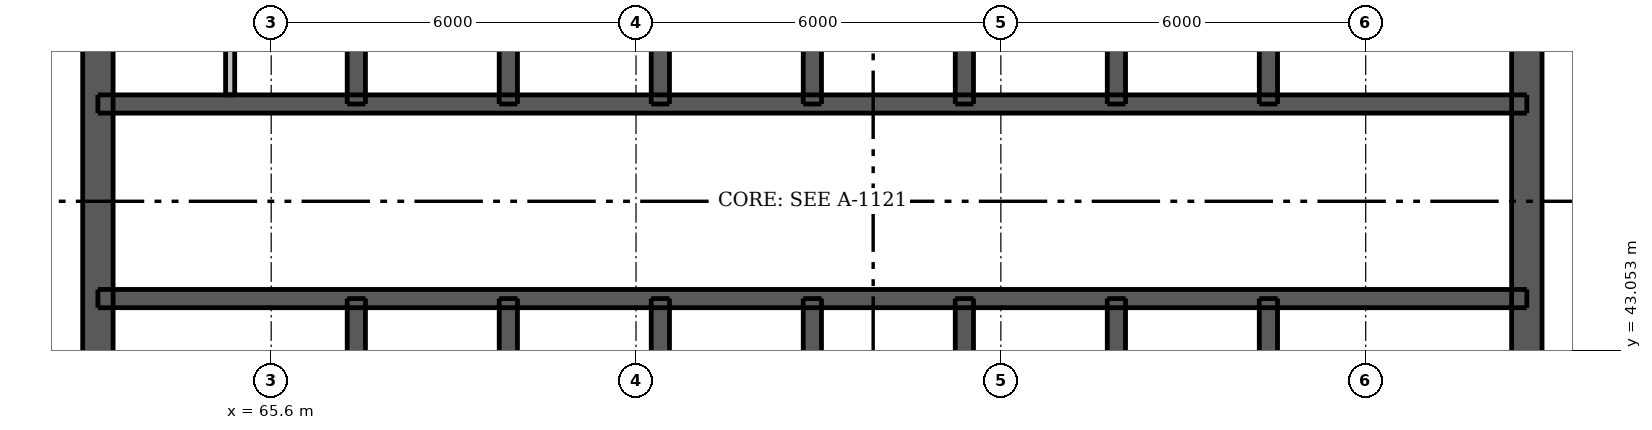
"""IFC4 building model, lengths in metres.
Left out: names, types, materials, properties, quantities, classifications, styles, units other than length and angle.
Written with IfcOpenShell. Run it as: python <this file> out.ifc"""

import sys

from ifc_helpers import new_model, si_unit, direction, frame, frame_2d, origin, place, context, subcontext, project, spatial, rectangle, extrude, element, fill, save


model = new_model("IFC4")
c1 = context("Model", 3, precision=1e-05, world=origin(), true_north=direction((0.0, 1.0)))
c2 = subcontext(c1, "Body", "Model", "MODEL_VIEW")
j1 = project(units=[si_unit("LENGTHUNIT", "METRE"), si_unit("PLANEANGLEUNIT", "RADIAN")], contexts=[c1])
p1 = place(None, origin())
s1 = spatial("IfcSite", under=j1, at=p1, CompositionType="ELEMENT")
p2 = place(p1, origin())
s2 = spatial("IfcBuilding", under=s1, at=p2, CompositionType="ELEMENT")
p3 = place(p2, frame((0.0, 0.0, 278.5)))
s3 = spatial("IfcBuildingStorey", under=s2, at=p3, CompositionType="ELEMENT", Elevation=278.5)
p4 = place(p3, frame((62.75, 33.5, 0.0), z_axis=(0.0, 0.0, 1.0), x_axis=(0.0, 1.0, 0.0)))
e1 = element("IfcWall", 1, at=p4, inside=s3, PredefinedType="SHEAR", context=c2, shape_type="SweptSolid", body=[
    extrude(rectangle(XDim=24.0, YDim=0.5, at=frame_2d((12.0, 0.0))), origin(), (0.0, 0.0, 1.0), 3.0),
])
p5 = place(p4, frame((11.2, 0.0, 0.0)))
e2 = element("IfcOpeningElement", 2, at=p5, cuts=e1, PredefinedType="OPENING", context=c2, shape_type="SweptSolid", body=[
    extrude(rectangle(XDim=1.6, YDim=2.1, at=frame_2d((0.8, 1.05))), frame((0.0, 0.26, 0.0), z_axis=(0.0, -1.0, 0.0), x_axis=(1.0, 0.0, 0.0)), (0.0, 0.0, 1.0), 0.52),
])
p6 = place(p3, frame((86.25, 33.5, 0.0), z_axis=(0.0, 0.0, 1.0), x_axis=(0.0, 1.0, 0.0)))
e3 = element("IfcWall", 3, at=p6, inside=s3, PredefinedType="SHEAR", context=c2, shape_type="SweptSolid", body=[
    extrude(rectangle(XDim=24.0, YDim=0.5, at=frame_2d((12.0, 0.0))), origin(), (0.0, 0.0, 1.0), 3.0),
])
p7 = place(p6, frame((11.2, 0.0, 0.0)))
e4 = element("IfcOpeningElement", 4, at=p7, cuts=e3, PredefinedType="OPENING", context=c2, shape_type="SweptSolid", body=[
    extrude(rectangle(XDim=1.6, YDim=2.1, at=frame_2d((0.8, 1.05))), frame((0.0, 0.26, 0.0), z_axis=(0.0, -1.0, 0.0), x_axis=(1.0, 0.0, 0.0)), (0.0, 0.0, 1.0), 0.52),
])
p8 = place(p3, frame((62.75, 43.9, 0.0), z_axis=(0.0, 0.0, 1.0), x_axis=(1.0, 0.0, 0.0)))
e5 = element("IfcWall", 5, at=p8, inside=s3, PredefinedType="SHEAR", context=c2, shape_type="SweptSolid", body=[
    extrude(rectangle(XDim=23.5, YDim=0.3, at=frame_2d((11.75, 0.0))), origin(), (0.0, 0.0, 1.0), 3.0),
])
p9 = place(p8, frame((1.725, 0.0, 0.0)))
e6 = element("IfcOpeningElement", 6, at=p9, cuts=e5, PredefinedType="OPENING", context=c2, shape_type="SweptSolid", body=[
    extrude(rectangle(XDim=0.9, YDim=2.1, at=frame_2d((0.45, 1.05))), frame((0.0, 0.16, 0.0), z_axis=(0.0, -1.0, 0.0), x_axis=(1.0, 0.0, 0.0)), (0.0, 0.0, 1.0), 0.32),
])
p10 = place(p8, frame((20.875, 0.0, 0.0)))
e7 = element("IfcOpeningElement", 7, at=p10, cuts=e5, PredefinedType="OPENING", context=c2, shape_type="SweptSolid", body=[
    extrude(rectangle(XDim=0.9, YDim=2.1, at=frame_2d((0.45, 1.05))), frame((0.0, 0.16, 0.0), z_axis=(0.0, -1.0, 0.0), x_axis=(1.0, 0.0, 0.0)), (0.0, 0.0, 1.0), 0.32),
])
p11 = place(p8, frame((5.05, 0.0, 0.0)))
e8 = element("IfcOpeningElement", 8, at=p11, cuts=e5, PredefinedType="OPENING", context=c2, shape_type="SweptSolid", body=[
    extrude(rectangle(XDim=0.9, YDim=2.1, at=frame_2d((0.45, 1.05))), frame((0.0, 0.16, 0.0), z_axis=(0.0, -1.0, 0.0), x_axis=(1.0, 0.0, 0.0)), (0.0, 0.0, 1.0), 0.32),
])
p12 = place(p8, frame((10.05, 0.0, 0.0)))
e9 = element("IfcOpeningElement", 9, at=p12, cuts=e5, PredefinedType="OPENING", context=c2, shape_type="SweptSolid", body=[
    extrude(rectangle(XDim=0.9, YDim=2.1, at=frame_2d((0.45, 1.05))), frame((0.0, 0.16, 0.0), z_axis=(0.0, -1.0, 0.0), x_axis=(1.0, 0.0, 0.0)), (0.0, 0.0, 1.0), 0.32),
])
p13 = place(p8, frame((12.55, 0.0, 0.0)))
e10 = element("IfcOpeningElement", 10, at=p13, cuts=e5, PredefinedType="OPENING", context=c2, shape_type="SweptSolid", body=[
    extrude(rectangle(XDim=0.9, YDim=2.1, at=frame_2d((0.45, 1.05))), frame((0.0, 0.16, 0.0), z_axis=(0.0, -1.0, 0.0), x_axis=(1.0, 0.0, 0.0)), (0.0, 0.0, 1.0), 0.32),
])
p14 = place(p8, frame((17.55, 0.0, 0.0)))
e11 = element("IfcOpeningElement", 11, at=p14, cuts=e5, PredefinedType="OPENING", context=c2, shape_type="SweptSolid", body=[
    extrude(rectangle(XDim=0.9, YDim=2.1, at=frame_2d((0.45, 1.05))), frame((0.0, 0.16, 0.0), z_axis=(0.0, -1.0, 0.0), x_axis=(1.0, 0.0, 0.0)), (0.0, 0.0, 1.0), 0.32),
])
p15 = place(p3, frame((62.75, 47.1, 0.0), z_axis=(0.0, 0.0, 1.0), x_axis=(1.0, 0.0, 0.0)))
e12 = element("IfcWall", 12, at=p15, inside=s3, PredefinedType="SHEAR", context=c2, shape_type="SweptSolid", body=[
    extrude(rectangle(XDim=23.5, YDim=0.3, at=frame_2d((11.75, 0.0))), origin(), (0.0, 0.0, 1.0), 3.0),
])
p16 = place(p15, frame((0.762, 0.0, 0.0)))
e13 = element("IfcOpeningElement", 13, at=p16, cuts=e12, PredefinedType="OPENING", context=c2, shape_type="SweptSolid", body=[
    extrude(rectangle(XDim=0.9, YDim=2.1, at=frame_2d((0.45, 1.05))), frame((0.0, 0.16, 0.0), z_axis=(0.0, -1.0, 0.0), x_axis=(1.0, 0.0, 0.0)), (0.0, 0.0, 1.0), 0.32),
])
p17 = place(p15, frame((2.688, 0.0, 0.0)))
e14 = element("IfcOpeningElement", 14, at=p17, cuts=e12, PredefinedType="OPENING", context=c2, shape_type="SweptSolid", body=[
    extrude(rectangle(XDim=0.9, YDim=2.1, at=frame_2d((0.45, 1.05))), frame((0.0, 0.16, 0.0), z_axis=(0.0, -1.0, 0.0), x_axis=(1.0, 0.0, 0.0)), (0.0, 0.0, 1.0), 0.32),
])
p18 = place(p15, frame((20.875, 0.0, 0.0)))
e15 = element("IfcOpeningElement", 15, at=p18, cuts=e12, PredefinedType="OPENING", context=c2, shape_type="SweptSolid", body=[
    extrude(rectangle(XDim=0.9, YDim=2.1, at=frame_2d((0.45, 1.05))), frame((0.0, 0.16, 0.0), z_axis=(0.0, -1.0, 0.0), x_axis=(1.0, 0.0, 0.0)), (0.0, 0.0, 1.0), 0.32),
])
p19 = place(p15, frame((4.95, 0.0, 0.0)))
e16 = element("IfcOpeningElement", 16, at=p19, cuts=e12, PredefinedType="OPENING", context=c2, shape_type="SweptSolid", body=[
    extrude(rectangle(XDim=1.1, YDim=2.1, at=frame_2d((0.55, 1.05))), frame((0.0, 0.16, 0.0), z_axis=(0.0, -1.0, 0.0), x_axis=(1.0, 0.0, 0.0)), (0.0, 0.0, 1.0), 0.32),
])
p20 = place(p15, frame((7.45, 0.0, 0.0)))
e17 = element("IfcOpeningElement", 17, at=p20, cuts=e12, PredefinedType="OPENING", context=c2, shape_type="SweptSolid", body=[
    extrude(rectangle(XDim=1.1, YDim=2.1, at=frame_2d((0.55, 1.05))), frame((0.0, 0.16, 0.0), z_axis=(0.0, -1.0, 0.0), x_axis=(1.0, 0.0, 0.0)), (0.0, 0.0, 1.0), 0.32),
])
p21 = place(p15, frame((9.95, 0.0, 0.0)))
e18 = element("IfcOpeningElement", 18, at=p21, cuts=e12, PredefinedType="OPENING", context=c2, shape_type="SweptSolid", body=[
    extrude(rectangle(XDim=1.1, YDim=2.1, at=frame_2d((0.55, 1.05))), frame((0.0, 0.16, 0.0), z_axis=(0.0, -1.0, 0.0), x_axis=(1.0, 0.0, 0.0)), (0.0, 0.0, 1.0), 0.32),
])
p22 = place(p15, frame((12.45, 0.0, 0.0)))
e19 = element("IfcOpeningElement", 19, at=p22, cuts=e12, PredefinedType="OPENING", context=c2, shape_type="SweptSolid", body=[
    extrude(rectangle(XDim=1.1, YDim=2.1, at=frame_2d((0.55, 1.05))), frame((0.0, 0.16, 0.0), z_axis=(0.0, -1.0, 0.0), x_axis=(1.0, 0.0, 0.0)), (0.0, 0.0, 1.0), 0.32),
])
p23 = place(p15, frame((14.95, 0.0, 0.0)))
e20 = element("IfcOpeningElement", 20, at=p23, cuts=e12, PredefinedType="OPENING", context=c2, shape_type="SweptSolid", body=[
    extrude(rectangle(XDim=1.1, YDim=2.1, at=frame_2d((0.55, 1.05))), frame((0.0, 0.16, 0.0), z_axis=(0.0, -1.0, 0.0), x_axis=(1.0, 0.0, 0.0)), (0.0, 0.0, 1.0), 0.32),
])
p24 = place(p15, frame((17.45, 0.0, 0.0)))
e21 = element("IfcOpeningElement", 21, at=p24, cuts=e12, PredefinedType="OPENING", context=c2, shape_type="SweptSolid", body=[
    extrude(rectangle(XDim=1.1, YDim=2.1, at=frame_2d((0.55, 1.05))), frame((0.0, 0.16, 0.0), z_axis=(0.0, -1.0, 0.0), x_axis=(1.0, 0.0, 0.0)), (0.0, 0.0, 1.0), 0.32),
])
p25 = place(p3, frame((67.0, 33.75, 0.0), z_axis=(0.0, 0.0, 1.0), x_axis=(0.0, 1.0, 0.0)))
e22 = element("IfcWall", 22, at=p25, inside=s3, PredefinedType="SHEAR", context=c2, shape_type="SweptSolid", body=[
    extrude(rectangle(XDim=10.15, YDim=0.3, at=frame_2d((5.075, 0.0))), origin(), (0.0, 0.0, 1.0), 3.0),
])
p26 = place(p25, frame((0.45, 0.0, 0.0)))
e23 = element("IfcOpeningElement", 23, at=p26, cuts=e22, PredefinedType="OPENING", context=c2, shape_type="SweptSolid", body=[
    extrude(rectangle(XDim=1.1, YDim=2.1, at=frame_2d((0.55, 1.05))), frame((0.0, 0.16, 0.0), z_axis=(0.0, -1.0, 0.0), x_axis=(1.0, 0.0, 0.0)), (0.0, 0.0, 1.0), 0.32),
])
for number, where, z_axis, x_axis in (
    (24, (67.0, 47.1, 0.0), (0.0, 0.0, 1.0), (0.0, 1.0, 0.0)),
    (25, (82.0, 33.75, 0.0), (0.0, 0.0, 1.0), (0.0, 1.0, 0.0)),
    (26, (82.0, 47.1, 0.0), (0.0, 0.0, 1.0), (0.0, 1.0, 0.0)),
):
    element("IfcWall", number, at=place(p3, frame(where, z_axis=z_axis, x_axis=x_axis)), inside=s3, PredefinedType="SHEAR", context=c2, shape_type="SweptSolid", body=[
        extrude(rectangle(XDim=10.15, YDim=0.3, at=frame_2d((5.075, 0.0))), origin(), (0.0, 0.0, 1.0), 3.0),
    ])
for number, where, z_axis, x_axis in (
    (27, (69.5, 41.0, 0.0), (0.0, 0.0, 1.0), (0.0, 1.0, 0.0)),
    (28, (69.5, 47.1, 0.0), (0.0, 0.0, 1.0), (0.0, 1.0, 0.0)),
    (29, (72.0, 41.0, 0.0), (0.0, 0.0, 1.0), (0.0, 1.0, 0.0)),
    (30, (72.0, 47.1, 0.0), (0.0, 0.0, 1.0), (0.0, 1.0, 0.0)),
    (31, (74.5, 41.0, 0.0), (0.0, 0.0, 1.0), (0.0, 1.0, 0.0)),
    (32, (74.5, 47.1, 0.0), (0.0, 0.0, 1.0), (0.0, 1.0, 0.0)),
    (33, (77.0, 41.0, 0.0), (0.0, 0.0, 1.0), (0.0, 1.0, 0.0)),
    (34, (77.0, 47.1, 0.0), (0.0, 0.0, 1.0), (0.0, 1.0, 0.0)),
    (35, (79.5, 41.0, 0.0), (0.0, 0.0, 1.0), (0.0, 1.0, 0.0)),
    (36, (79.5, 47.1, 0.0), (0.0, 0.0, 1.0), (0.0, 1.0, 0.0)),
):
    element("IfcWall", number, at=place(p3, frame(where, z_axis=z_axis, x_axis=x_axis)), inside=s3, PredefinedType="SHEAR", context=c2, shape_type="SweptSolid", body=[
        extrude(rectangle(XDim=2.9, YDim=0.3, at=frame_2d((1.45, 0.0))), origin(), (0.0, 0.0, 1.0), 3.0),
    ])
p27 = place(p3, frame((64.925, 47.25, 0.0), z_axis=(0.0, 0.0, 1.0), x_axis=(0.0, 1.0, 0.0)))
e37 = element("IfcWall", 37, at=p27, inside=s3, PredefinedType="PLUMBINGWALL", context=c2, shape_type="SweptSolid", body=[
    extrude(rectangle(XDim=2.6, YDim=0.15, at=frame_2d((1.3, 0.0))), origin(), (0.0, 0.0, 1.0), 3.0),
])
p28 = place(p5, origin())
e38 = element("IfcDoor", 38, at=p28, inside=s3, OperationType="DOUBLE_DOOR_SINGLE_SWING", PredefinedType="DOOR", context=c2, shape_type="SweptSolid", body=[
    extrude(rectangle(XDim=1.6, YDim=2.1, at=frame_2d((0.8, 1.05))), frame((0.0, -0.188, 0.0), z_axis=(0.0, -1.0, 0.0), x_axis=(1.0, 0.0, 0.0)), (0.0, 0.0, 1.0), 0.05),
])
fill(e2, e38)
p29 = place(p7, origin())
e39 = element("IfcDoor", 39, at=p29, inside=s3, OperationType="DOUBLE_DOOR_SINGLE_SWING", PredefinedType="DOOR", context=c2, shape_type="SweptSolid", body=[
    extrude(rectangle(XDim=1.6, YDim=2.1, at=frame_2d((0.8, 1.05))), frame((0.0, 0.237, 0.0), z_axis=(0.0, -1.0, 0.0), x_axis=(1.0, 0.0, 0.0)), (0.0, 0.0, 1.0), 0.05),
])
fill(e4, e39)
p30 = place(p9, origin())
e40 = element("IfcDoor", 40, at=p30, inside=s3, OperationType="SINGLE_SWING_LEFT", PredefinedType="DOOR", context=c2, shape_type="SweptSolid", body=[
    extrude(rectangle(XDim=0.9, YDim=2.1, at=frame_2d((0.45, 1.05))), frame((0.0, -0.087, 0.0), z_axis=(0.0, -1.0, 0.0), x_axis=(1.0, 0.0, 0.0)), (0.0, 0.0, 1.0), 0.05),
])
fill(e6, e40)
p31 = place(p10, origin())
e41 = element("IfcDoor", 41, at=p31, inside=s3, OperationType="SINGLE_SWING_LEFT", PredefinedType="DOOR", context=c2, shape_type="SweptSolid", body=[
    extrude(rectangle(XDim=0.9, YDim=2.1, at=frame_2d((0.45, 1.05))), frame((0.0, -0.087, 0.0), z_axis=(0.0, -1.0, 0.0), x_axis=(1.0, 0.0, 0.0)), (0.0, 0.0, 1.0), 0.05),
])
fill(e7, e41)
p32 = place(p16, origin())
e42 = element("IfcDoor", 42, at=p32, inside=s3, OperationType="SINGLE_SWING_LEFT", PredefinedType="DOOR", context=c2, shape_type="SweptSolid", body=[
    extrude(rectangle(XDim=0.9, YDim=2.1, at=frame_2d((0.45, 1.05))), frame((0.0, 0.138, 0.0), z_axis=(0.0, -1.0, 0.0), x_axis=(1.0, 0.0, 0.0)), (0.0, 0.0, 1.0), 0.05),
])
fill(e13, e42)
p33 = place(p17, origin())
e43 = element("IfcDoor", 43, at=p33, inside=s3, OperationType="SINGLE_SWING_RIGHT", PredefinedType="DOOR", context=c2, shape_type="SweptSolid", body=[
    extrude(rectangle(XDim=0.9, YDim=2.1, at=frame_2d((0.45, 1.05))), frame((0.0, 0.138, 0.0), z_axis=(0.0, -1.0, 0.0), x_axis=(1.0, 0.0, 0.0)), (0.0, 0.0, 1.0), 0.05),
])
fill(e14, e43)
p34 = place(p18, origin())
e44 = element("IfcDoor", 44, at=p34, inside=s3, OperationType="SINGLE_SWING_LEFT", PredefinedType="DOOR", context=c2, shape_type="SweptSolid", body=[
    extrude(rectangle(XDim=0.9, YDim=2.1, at=frame_2d((0.45, 1.05))), frame((0.0, 0.138, 0.0), z_axis=(0.0, -1.0, 0.0), x_axis=(1.0, 0.0, 0.0)), (0.0, 0.0, 1.0), 0.05),
])
fill(e15, e44)
p35 = place(p11, origin())
e45 = element("IfcDoor", 45, at=p35, inside=s3, OperationType="SINGLE_SWING_RIGHT", PredefinedType="DOOR", context=c2, shape_type="SweptSolid", body=[
    extrude(rectangle(XDim=0.9, YDim=2.1, at=frame_2d((0.45, 1.05))), frame((0.0, -0.087, 0.0), z_axis=(0.0, -1.0, 0.0), x_axis=(1.0, 0.0, 0.0)), (0.0, 0.0, 1.0), 0.05),
])
fill(e8, e45)
p36 = place(p12, origin())
e46 = element("IfcDoor", 46, at=p36, inside=s3, OperationType="SINGLE_SWING_RIGHT", PredefinedType="DOOR", context=c2, shape_type="SweptSolid", body=[
    extrude(rectangle(XDim=0.9, YDim=2.1, at=frame_2d((0.45, 1.05))), frame((0.0, -0.087, 0.0), z_axis=(0.0, -1.0, 0.0), x_axis=(1.0, 0.0, 0.0)), (0.0, 0.0, 1.0), 0.05),
])
fill(e9, e46)
p37 = place(p13, origin())
e47 = element("IfcDoor", 47, at=p37, inside=s3, OperationType="SINGLE_SWING_LEFT", PredefinedType="DOOR", context=c2, shape_type="SweptSolid", body=[
    extrude(rectangle(XDim=0.9, YDim=2.1, at=frame_2d((0.45, 1.05))), frame((0.0, -0.087, 0.0), z_axis=(0.0, -1.0, 0.0), x_axis=(1.0, 0.0, 0.0)), (0.0, 0.0, 1.0), 0.05),
])
fill(e10, e47)
p38 = place(p14, origin())
e48 = element("IfcDoor", 48, at=p38, inside=s3, OperationType="SINGLE_SWING_LEFT", PredefinedType="DOOR", context=c2, shape_type="SweptSolid", body=[
    extrude(rectangle(XDim=0.9, YDim=2.1, at=frame_2d((0.45, 1.05))), frame((0.0, -0.087, 0.0), z_axis=(0.0, -1.0, 0.0), x_axis=(1.0, 0.0, 0.0)), (0.0, 0.0, 1.0), 0.05),
])
fill(e11, e48)
p39 = place(p19, origin())
e49 = element("IfcDoor", 49, at=p39, inside=s3, OperationType="DOUBLE_DOOR_SLIDING", PredefinedType="DOOR", context=c2, shape_type="SweptSolid", body=[
    extrude(rectangle(XDim=1.1, YDim=2.1, at=frame_2d((0.55, 1.05))), frame((0.0, 0.025, 0.0), z_axis=(0.0, -1.0, 0.0), x_axis=(1.0, 0.0, 0.0)), (0.0, 0.0, 1.0), 0.05),
])
fill(e16, e49)
p40 = place(p20, origin())
e50 = element("IfcDoor", 50, at=p40, inside=s3, OperationType="DOUBLE_DOOR_SLIDING", PredefinedType="DOOR", context=c2, shape_type="SweptSolid", body=[
    extrude(rectangle(XDim=1.1, YDim=2.1, at=frame_2d((0.55, 1.05))), frame((0.0, 0.025, 0.0), z_axis=(0.0, -1.0, 0.0), x_axis=(1.0, 0.0, 0.0)), (0.0, 0.0, 1.0), 0.05),
])
fill(e17, e50)
p41 = place(p21, origin())
e51 = element("IfcDoor", 51, at=p41, inside=s3, OperationType="DOUBLE_DOOR_SLIDING", PredefinedType="DOOR", context=c2, shape_type="SweptSolid", body=[
    extrude(rectangle(XDim=1.1, YDim=2.1, at=frame_2d((0.55, 1.05))), frame((0.0, 0.025, 0.0), z_axis=(0.0, -1.0, 0.0), x_axis=(1.0, 0.0, 0.0)), (0.0, 0.0, 1.0), 0.05),
])
fill(e18, e51)
p42 = place(p22, origin())
e52 = element("IfcDoor", 52, at=p42, inside=s3, OperationType="DOUBLE_DOOR_SLIDING", PredefinedType="DOOR", context=c2, shape_type="SweptSolid", body=[
    extrude(rectangle(XDim=1.1, YDim=2.1, at=frame_2d((0.55, 1.05))), frame((0.0, 0.025, 0.0), z_axis=(0.0, -1.0, 0.0), x_axis=(1.0, 0.0, 0.0)), (0.0, 0.0, 1.0), 0.05),
])
fill(e19, e52)
p43 = place(p23, origin())
e53 = element("IfcDoor", 53, at=p43, inside=s3, OperationType="DOUBLE_DOOR_SLIDING", PredefinedType="DOOR", context=c2, shape_type="SweptSolid", body=[
    extrude(rectangle(XDim=1.1, YDim=2.1, at=frame_2d((0.55, 1.05))), frame((0.0, 0.025, 0.0), z_axis=(0.0, -1.0, 0.0), x_axis=(1.0, 0.0, 0.0)), (0.0, 0.0, 1.0), 0.05),
])
fill(e20, e53)
p44 = place(p24, origin())
e54 = element("IfcDoor", 54, at=p44, inside=s3, OperationType="DOUBLE_DOOR_SLIDING", PredefinedType="DOOR", context=c2, shape_type="SweptSolid", body=[
    extrude(rectangle(XDim=1.1, YDim=2.1, at=frame_2d((0.55, 1.05))), frame((0.0, 0.025, 0.0), z_axis=(0.0, -1.0, 0.0), x_axis=(1.0, 0.0, 0.0)), (0.0, 0.0, 1.0), 0.05),
])
fill(e21, e54)
save(model, sys.argv[1])
